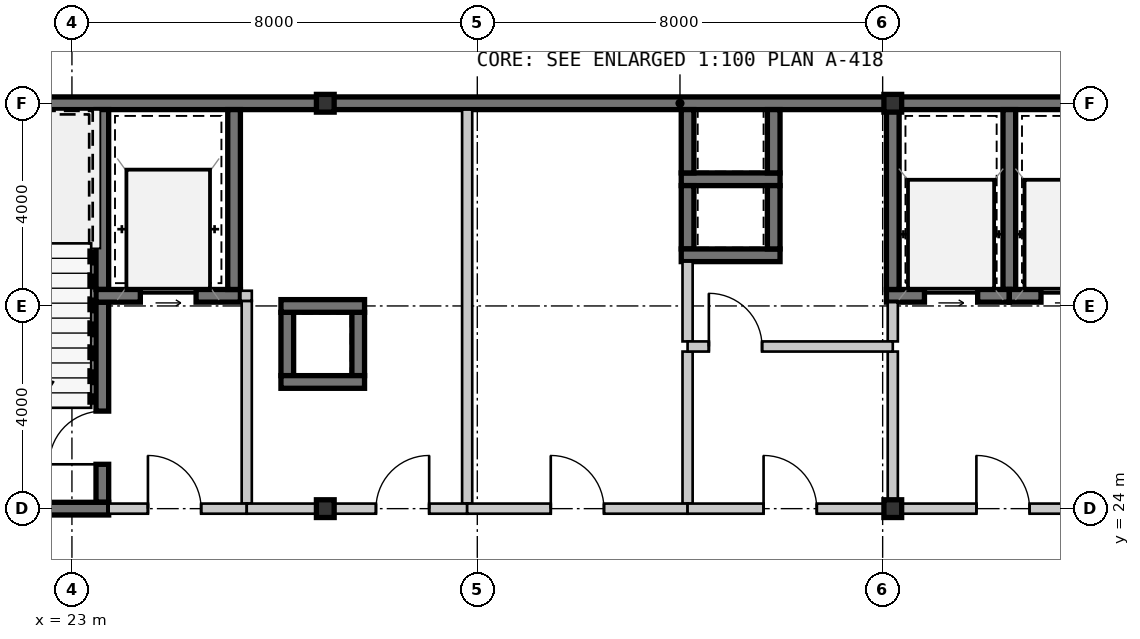
"""IFC4 building model, lengths in metres.
Left out: names, types, materials, properties, quantities, classifications, styles, units other than length and angle.
Written with IfcOpenShell. Run it as: python <this file> out.ifc"""

import sys

from ifc_helpers import new_model, si_unit, direction, frame, frame_2d, origin, origin_2d, place, context, subcontext, project, spatial, rectangle, hollow_rectangle, extrude, source, transform, mapped, element, fill, save


model = new_model("IFC4")
c1 = context("Model", 3, precision=1e-05, world=origin(), true_north=direction((0.0, 1.0)))
c2 = subcontext(c1, "Body", "Model", "MODEL_VIEW")
j1 = project(units=[si_unit("LENGTHUNIT", "METRE"), si_unit("PLANEANGLEUNIT", "RADIAN")], contexts=[c1])
p1 = place(None, origin())
s1 = spatial("IfcSite", under=j1, at=p1, CompositionType="ELEMENT")
p2 = place(p1, origin())
s2 = spatial("IfcBuilding", under=s1, at=p2, CompositionType="ELEMENT")
p3 = place(p2, frame((0.0, 0.0, 172.55)))
s3 = spatial("IfcBuildingStorey", under=s2, at=p3, CompositionType="ELEMENT", Elevation=172.55)
m1 = source(origin(), c2, "Body", "SweptSolid", [
    extrude(hollow_rectangle(XDim=0.35, YDim=0.35, WallThickness=0.016, at=origin_2d()), origin(), (0.0, 0.0, 1.0), 3.15),
])
for number, where, z_axis, x_axis in (
    (1, (28.0, 24.0, 0.0), (0.0, 0.0, 1.0), (1.0, 0.0, 0.0)),
    (2, (39.2, 24.0, 0.0), (0.0, 0.0, 1.0), (1.0, 0.0, 0.0)),
    (3, (28.0, 32.0, 0.0), (0.0, 0.0, 1.0), (1.0, 0.0, 0.0)),
    (4, (39.2, 32.0, 0.0), (0.0, 0.0, 1.0), (1.0, 0.0, 0.0)),
):
    element("IfcColumn", number, at=place(p3, frame(where, z_axis=z_axis, x_axis=x_axis)), inside=s3, PredefinedType="COLUMN", context=c2, shape_type="MappedRepresentation", body=[
        mapped(m1, transform((0.0, 0.0, 0.0), scale=1.0)),
    ])
m2 = source(origin(), c2, "Body", "SweptSolid", [
    extrude(rectangle(XDim=9.125, YDim=0.25, at=frame_2d((4.562, 0.0))), origin(), (0.0, 0.0, 1.0), 2.93),
])
p4 = place(p3, frame((18.875, 32.0, 0.0), z_axis=(0.0, 0.0, 1.0), x_axis=(1.0, 0.0, 0.0)))
e5 = element("IfcWall", 5, at=p4, inside=s3, PredefinedType="SHEAR", context=c2, shape_type="MappedRepresentation", body=[
    mapped(m2, transform((0.0, 0.0, 0.0), scale=1.0)),
])
m3 = source(origin(), c2, "Body", "SweptSolid", [
    extrude(rectangle(XDim=11.2, YDim=0.25, at=frame_2d((5.6, 0.0))), origin(), (0.0, 0.0, 1.0), 2.93),
])
p5 = place(p3, frame((28.0, 32.0, 0.0), z_axis=(0.0, 0.0, 1.0), x_axis=(1.0, 0.0, 0.0)))
e6 = element("IfcWall", 6, at=p5, inside=s3, PredefinedType="SHEAR", context=c2, shape_type="MappedRepresentation", body=[
    mapped(m3, transform((0.0, 0.0, 0.0), scale=1.0)),
])
m4 = source(origin(), c2, "Body", "SweptSolid", [
    extrude(rectangle(XDim=11.925, YDim=0.25, at=frame_2d((5.962, 0.0))), origin(), (0.0, 0.0, 1.0), 2.93),
])
p6 = place(p3, frame((39.2, 32.0, 0.0), z_axis=(0.0, 0.0, 1.0), x_axis=(1.0, 0.0, 0.0)))
e7 = element("IfcWall", 7, at=p6, inside=s3, PredefinedType="SHEAR", context=c2, shape_type="MappedRepresentation", body=[
    mapped(m4, transform((0.0, 0.0, 0.0), scale=1.0)),
])
m5 = source(origin(), c2, "Body", "SweptSolid", [
    extrude(rectangle(XDim=3.55, YDim=0.25, at=frame_2d((1.775, 0.0))), origin(), (0.0, 0.0, 1.0), 2.93),
])
p7 = place(p3, frame((23.6, 28.325, 0.0), z_axis=(0.0, 0.0, 1.0), x_axis=(0.0, 1.0, 0.0)))
e8 = element("IfcWall", 8, at=p7, inside=s3, PredefinedType="SHEAR", context=c2, shape_type="MappedRepresentation", body=[
    mapped(m5, transform((0.0, 0.0, 0.0), scale=1.0)),
])
m6 = source(origin(), c2, "Body", "SweptSolid", [
    extrude(rectangle(XDim=3.95, YDim=0.25, at=frame_2d((1.975, 0.0))), origin(), (0.0, 0.0, 1.0), 2.93),
])
p8 = place(p3, frame((23.6, 24.125, 0.0), z_axis=(0.0, 0.0, 1.0), x_axis=(0.0, 1.0, 0.0)))
e9 = element("IfcWall", 9, at=p8, inside=s3, PredefinedType="SHEAR", context=c2, shape_type="MappedRepresentation", body=[
    mapped(m6, transform((0.0, 0.0, 0.0), scale=1.0)),
])
m7 = source(origin(), c2, "Body", "SweptSolid", [
    extrude(rectangle(XDim=1.05, YDim=2.1, at=frame_2d((0.525, 1.05))), frame((0.0, 0.135, 0.0), z_axis=(0.0, -1.0, 0.0), x_axis=(1.0, 0.0, 0.0)), (0.0, 0.0, 1.0), 0.27),
])
p9 = place(p8, frame((0.75, 0.0, 0.0)))
e10 = element("IfcOpeningElement", 10, at=p9, cuts=e9, PredefinedType="OPENING", context=c2, shape_type="MappedRepresentation", body=[
    mapped(m7, transform((0.0, 0.0, 0.0), scale=1.0)),
])
m8 = source(origin(), c2, "Body", "SweptSolid", [
    extrude(rectangle(XDim=4.85, YDim=0.25, at=frame_2d((2.425, 0.0))), origin(), (0.0, 0.0, 1.0), 2.93),
])
p10 = place(p3, frame((18.875, 24.0, 0.0), z_axis=(0.0, 0.0, 1.0), x_axis=(1.0, 0.0, 0.0)))
e11 = element("IfcWall", 11, at=p10, inside=s3, PredefinedType="SHEAR", context=c2, shape_type="MappedRepresentation", body=[
    mapped(m8, transform((0.0, 0.0, 0.0), scale=1.0)),
])
m9 = source(origin(), c2, "Body", "SweptSolid", [
    extrude(rectangle(XDim=2.85, YDim=0.25, at=frame_2d((1.425, 0.0))), origin(), (0.0, 0.0, 1.0), 2.93),
])
p11 = place(p3, frame((23.475, 28.2, 0.0), z_axis=(0.0, 0.0, 1.0), x_axis=(1.0, 0.0, 0.0)))
e12 = element("IfcWall", 12, at=p11, inside=s3, PredefinedType="SHEAR", context=c2, shape_type="MappedRepresentation", body=[
    mapped(m9, transform((0.0, 0.0, 0.0), scale=1.0)),
])
m10 = source(origin(), c2, "Body", "SweptSolid", [
    extrude(rectangle(XDim=1.1, YDim=2.15, at=frame_2d((0.55, 1.075))), frame((0.0, 0.135, 0.0), z_axis=(0.0, -1.0, 0.0), x_axis=(1.0, 0.0, 0.0)), (0.0, 0.0, 1.0), 0.27),
])
p12 = place(p11, frame((0.875, 0.0, 0.0)))
e13 = element("IfcOpeningElement", 13, at=p12, cuts=e12, PredefinedType="OPENING", context=c2, shape_type="MappedRepresentation", body=[
    mapped(m10, transform((0.0, 0.0, 0.0), scale=1.0)),
])
p13 = place(p3, frame((26.2, 28.325, 0.0), z_axis=(0.0, 0.0, 1.0), x_axis=(0.0, 1.0, 0.0)))
e14 = element("IfcWall", 14, at=p13, inside=s3, PredefinedType="SHEAR", context=c2, shape_type="MappedRepresentation", body=[
    mapped(m5, transform((0.0, 0.0, 0.0), scale=1.0)),
])
m11 = source(origin(), c2, "Body", "SweptSolid", [
    extrude(rectangle(XDim=4.0, YDim=0.2, at=frame_2d((2.0, 0.0))), origin(), (0.0, 0.0, 1.0), 2.93),
])
p14 = place(p3, frame((26.45, 24.1, 0.0), z_axis=(0.0, 0.0, 1.0), x_axis=(0.0, 1.0, 0.0)))
e15 = element("IfcWall", 15, at=p14, inside=s3, PredefinedType="SOLIDWALL", context=c2, shape_type="MappedRepresentation", body=[
    mapped(m11, transform((0.0, 0.0, 0.0), scale=1.0)),
])
m12 = source(origin(), c2, "Body", "SweptSolid", [
    extrude(rectangle(XDim=2.725, YDim=0.2, at=frame_2d((1.362, 0.0))), origin(), (0.0, 0.0, 1.0), 2.47),
])
p15 = place(p3, frame((23.725, 24.0, 0.0), z_axis=(0.0, 0.0, 1.0), x_axis=(1.0, 0.0, 0.0)))
e16 = element("IfcWall", 16, at=p15, inside=s3, PredefinedType="SOLIDWALL", context=c2, shape_type="MappedRepresentation", body=[
    mapped(m12, transform((0.0, 0.0, 0.0), scale=1.0)),
])
m13 = source(origin(), c2, "Body", "SweptSolid", [
    extrude(rectangle(XDim=1.05, YDim=2.1, at=frame_2d((0.525, 1.05))), frame((0.0, 0.11, 0.0), z_axis=(0.0, -1.0, 0.0), x_axis=(1.0, 0.0, 0.0)), (0.0, 0.0, 1.0), 0.22),
])
p16 = place(p15, frame((0.775, 0.0, 0.0)))
e17 = element("IfcOpeningElement", 17, at=p16, cuts=e16, PredefinedType="OPENING", context=c2, shape_type="MappedRepresentation", body=[
    mapped(m13, transform((0.0, 0.0, 0.0), scale=1.0)),
])
m14 = source(origin(), c2, "Body", "SweptSolid", [
    extrude(rectangle(XDim=1.95, YDim=0.25, at=frame_2d((0.975, 0.0))), origin(), (0.0, 0.0, 1.0), 2.93),
])
p17 = place(p3, frame((35.025, 30.5, 0.0), z_axis=(0.0, 0.0, 1.0), x_axis=(1.0, 0.0, 0.0)))
e18 = element("IfcWall", 18, at=p17, inside=s3, PredefinedType="SHEAR", context=c2, shape_type="MappedRepresentation", body=[
    mapped(m14, transform((0.0, 0.0, 0.0), scale=1.0)),
])
m15 = source(origin(), c2, "Body", "SweptSolid", [
    extrude(rectangle(XDim=1.25, YDim=0.25, at=frame_2d((0.625, 0.0))), origin(), (0.0, 0.0, 1.0), 2.93),
])
for number, where, z_axis, x_axis in (
    (19, (35.15, 31.875, 0.0), (0.0, 0.0, 1.0), (0.0, -1.0, 0.0)),
    (20, (36.85, 30.625, 0.0), (0.0, 0.0, 1.0), (0.0, 1.0, 0.0)),
    (21, (35.15, 30.375, 0.0), (0.0, 0.0, 1.0), (0.0, -1.0, 0.0)),
):
    element("IfcWall", number, at=place(p3, frame(where, z_axis=z_axis, x_axis=x_axis)), inside=s3, PredefinedType="SHEAR", context=c2, shape_type="MappedRepresentation", body=[
        mapped(m15, transform((0.0, 0.0, 0.0), scale=1.0)),
    ])
p18 = place(p3, frame((35.025, 29.0, 0.0), z_axis=(0.0, 0.0, 1.0), x_axis=(1.0, 0.0, 0.0)))
e22 = element("IfcWall", 22, at=p18, inside=s3, PredefinedType="SHEAR", context=c2, shape_type="MappedRepresentation", body=[
    mapped(m14, transform((0.0, 0.0, 0.0), scale=1.0)),
])
for number, where, z_axis, x_axis in (
    (23, (36.85, 29.125, 0.0), (0.0, 0.0, 1.0), (0.0, 1.0, 0.0)),
    (24, (28.65, 26.625, 0.0), (0.0, 0.0, 1.0), (0.0, 1.0, 0.0)),
    (25, (27.25, 27.875, 0.0), (0.0, 0.0, 1.0), (0.0, -1.0, 0.0)),
):
    element("IfcWall", number, at=place(p3, frame(where, z_axis=z_axis, x_axis=x_axis)), inside=s3, PredefinedType="SHEAR", context=c2, shape_type="MappedRepresentation", body=[
        mapped(m15, transform((0.0, 0.0, 0.0), scale=1.0)),
    ])
m16 = source(origin(), c2, "Body", "SweptSolid", [
    extrude(rectangle(XDim=1.65, YDim=0.25, at=frame_2d((0.825, 0.0))), origin(), (0.0, 0.0, 1.0), 2.93),
])
for number, where, z_axis, x_axis in (
    (26, (28.775, 28.0, 0.0), (0.0, 0.0, 1.0), (-1.0, 0.0, 0.0)),
    (27, (27.125, 26.5, 0.0), (0.0, 0.0, 1.0), (1.0, 0.0, 0.0)),
):
    element("IfcWall", number, at=place(p3, frame(where, z_axis=z_axis, x_axis=x_axis)), inside=s3, PredefinedType="SHEAR", context=c2, shape_type="MappedRepresentation", body=[
        mapped(m16, transform((0.0, 0.0, 0.0), scale=1.0)),
    ])
p19 = place(p3, frame((41.5, 28.325, 0.0), z_axis=(0.0, 0.0, 1.0), x_axis=(0.0, 1.0, 0.0)))
e28 = element("IfcWall", 28, at=p19, inside=s3, PredefinedType="SHEAR", context=c2, shape_type="MappedRepresentation", body=[
    mapped(m5, transform((0.0, 0.0, 0.0), scale=1.0)),
])
m17 = source(origin(), c2, "Body", "SweptSolid", [
    extrude(rectangle(XDim=2.425, YDim=0.25, at=frame_2d((1.212, 0.0))), origin(), (0.0, 0.0, 1.0), 2.93),
])
p20 = place(p3, frame((39.075, 28.2, 0.0), z_axis=(0.0, 0.0, 1.0), x_axis=(1.0, 0.0, 0.0)))
e29 = element("IfcWall", 29, at=p20, inside=s3, PredefinedType="SHEAR", context=c2, shape_type="MappedRepresentation", body=[
    mapped(m17, transform((0.0, 0.0, 0.0), scale=1.0)),
])
m18 = source(origin(), c2, "Body", "SweptSolid", [
    extrude(rectangle(XDim=1.05, YDim=2.15, at=frame_2d((0.525, 1.075))), frame((0.0, 0.135, 0.0), z_axis=(0.0, -1.0, 0.0), x_axis=(1.0, 0.0, 0.0)), (0.0, 0.0, 1.0), 0.27),
])
p21 = place(p20, frame((0.75, 0.0, 0.0)))
e30 = element("IfcOpeningElement", 30, at=p21, cuts=e29, PredefinedType="OPENING", context=c2, shape_type="MappedRepresentation", body=[
    mapped(m18, transform((0.0, 0.0, 0.0), scale=1.0)),
])
p22 = place(p3, frame((39.2, 31.875, 0.0), z_axis=(0.0, 0.0, 1.0), x_axis=(0.0, -1.0, 0.0)))
e31 = element("IfcWall", 31, at=p22, inside=s3, PredefinedType="SHEAR", context=c2, shape_type="MappedRepresentation", body=[
    mapped(m5, transform((0.0, 0.0, 0.0), scale=1.0)),
])
m19 = source(origin(), c2, "Body", "SweptSolid", [
    extrude(rectangle(XDim=2.07, YDim=0.25, at=frame_2d((1.035, 0.0))), origin(), (0.0, 0.0, 1.0), 2.93),
])
p23 = place(p3, frame((41.5, 28.2, 0.0), z_axis=(0.0, 0.0, 1.0), x_axis=(1.0, 0.0, 0.0)))
e32 = element("IfcWall", 32, at=p23, inside=s3, PredefinedType="SHEAR", context=c2, shape_type="MappedRepresentation", body=[
    mapped(m19, transform((0.0, 0.0, 0.0), scale=1.0)),
])
p24 = place(p23, frame((0.625, 0.0, 0.0)))
e33 = element("IfcOpeningElement", 33, at=p24, cuts=e32, PredefinedType="OPENING", context=c2, shape_type="MappedRepresentation", body=[
    mapped(m18, transform((0.0, 0.0, 0.0), scale=1.0)),
])
m20 = source(origin(), c2, "Body", "SweptSolid", [
    extrude(rectangle(XDim=3.0, YDim=0.2, at=frame_2d((1.5, 0.0))), origin(), (0.0, 0.0, 1.0), 2.47),
])
p25 = place(p3, frame((39.2, 24.1, 0.0), z_axis=(0.0, 0.0, 1.0), x_axis=(0.0, 1.0, 0.0)))
e34 = element("IfcWall", 34, at=p25, inside=s3, PredefinedType="SOLIDWALL", context=c2, shape_type="MappedRepresentation", body=[
    mapped(m20, transform((0.0, 0.0, 0.0), scale=1.0)),
])
m21 = source(origin(), c2, "Body", "SweptSolid", [
    extrude(rectangle(XDim=0.775, YDim=0.2, at=frame_2d((0.387, 0.0))), origin(), (0.0, 0.0, 1.0), 2.47),
])
p26 = place(p3, frame((39.2, 27.3, 0.0), z_axis=(0.0, 0.0, 1.0), x_axis=(0.0, 1.0, 0.0)))
e35 = element("IfcWall", 35, at=p26, inside=s3, PredefinedType="SOLIDWALL", context=c2, shape_type="MappedRepresentation", body=[
    mapped(m21, transform((0.0, 0.0, 0.0), scale=1.0)),
])
m22 = source(origin(), c2, "Body", "SweptSolid", [
    extrude(rectangle(XDim=4.35, YDim=0.2, at=frame_2d((2.175, 0.0))), origin(), (0.0, 0.0, 1.0), 2.397),
])
p27 = place(p3, frame((43.55, 24.0, 0.0), z_axis=(0.0, 0.0, 1.0), x_axis=(-1.0, 0.0, 0.0)))
e36 = element("IfcWall", 36, at=p27, inside=s3, PredefinedType="SOLIDWALL", context=c2, shape_type="MappedRepresentation", body=[
    mapped(m22, transform((0.0, 0.0, 0.0), scale=1.0)),
])
p28 = place(p27, frame((1.65, 0.0, 0.0)))
e37 = element("IfcOpeningElement", 37, at=p28, cuts=e36, PredefinedType="OPENING", context=c2, shape_type="MappedRepresentation", body=[
    mapped(m13, transform((0.0, 0.0, 0.0), scale=1.0)),
])
m23 = source(origin(), c2, "Body", "SweptSolid", [
    extrude(rectangle(XDim=7.775, YDim=0.2, at=frame_2d((3.887, 0.0))), origin(), (0.0, 0.0, 1.0), 2.93),
])
p29 = place(p3, frame((30.8, 31.875, 0.0), z_axis=(0.0, 0.0, 1.0), x_axis=(0.0, -1.0, 0.0)))
e38 = element("IfcWall", 38, at=p29, inside=s3, PredefinedType="SOLIDWALL", context=c2, shape_type="MappedRepresentation", body=[
    mapped(m23, transform((0.0, 0.0, 0.0), scale=1.0)),
])
m24 = source(origin(), c2, "Body", "SweptSolid", [
    extrude(rectangle(XDim=4.35, YDim=0.2, at=frame_2d((2.175, 0.0))), origin(), (0.0, 0.0, 1.0), 2.47),
])
p30 = place(p3, frame((30.8, 24.0, 0.0), z_axis=(0.0, 0.0, 1.0), x_axis=(-1.0, 0.0, 0.0)))
e39 = element("IfcWall", 39, at=p30, inside=s3, PredefinedType="SOLIDWALL", context=c2, shape_type="MappedRepresentation", body=[
    mapped(m24, transform((0.0, 0.0, 0.0), scale=1.0)),
])
p31 = place(p30, frame((0.75, 0.0, 0.0)))
e40 = element("IfcOpeningElement", 40, at=p31, cuts=e39, PredefinedType="OPENING", context=c2, shape_type="MappedRepresentation", body=[
    mapped(m13, transform((0.0, 0.0, 0.0), scale=1.0)),
])
m25 = source(origin(), c2, "Body", "SweptSolid", [
    extrude(rectangle(XDim=3.0, YDim=0.2, at=frame_2d((1.5, 0.0))), origin(), (0.0, 0.0, 1.0), 2.93),
])
p32 = place(p3, frame((35.15, 27.1, 0.0), z_axis=(0.0, 0.0, 1.0), x_axis=(0.0, -1.0, 0.0)))
e41 = element("IfcWall", 41, at=p32, inside=s3, PredefinedType="SOLIDWALL", context=c2, shape_type="MappedRepresentation", body=[
    mapped(m25, transform((0.0, 0.0, 0.0), scale=1.0)),
])
m26 = source(origin(), c2, "Body", "SweptSolid", [
    extrude(rectangle(XDim=1.575, YDim=0.2, at=frame_2d((0.788, 0.0))), origin(), (0.0, 0.0, 1.0), 2.93),
])
p33 = place(p3, frame((35.15, 28.875, 0.0), z_axis=(0.0, 0.0, 1.0), x_axis=(0.0, -1.0, 0.0)))
e42 = element("IfcWall", 42, at=p33, inside=s3, PredefinedType="SOLIDWALL", context=c2, shape_type="MappedRepresentation", body=[
    mapped(m26, transform((0.0, 0.0, 0.0), scale=1.0)),
])
m27 = source(origin(), c2, "Body", "SweptSolid", [
    extrude(rectangle(XDim=4.35, YDim=0.2, at=frame_2d((2.175, 0.0))), origin(), (0.0, 0.0, 1.0), 2.47),
])
p34 = place(p3, frame((35.15, 24.0, 0.0), z_axis=(0.0, 0.0, 1.0), x_axis=(-1.0, 0.0, 0.0)))
e43 = element("IfcWall", 43, at=p34, inside=s3, PredefinedType="SOLIDWALL", context=c2, shape_type="MappedRepresentation", body=[
    mapped(m27, transform((0.0, 0.0, 0.0), scale=1.0)),
])
p35 = place(p34, frame((1.65, 0.0, 0.0)))
e44 = element("IfcOpeningElement", 44, at=p35, cuts=e43, PredefinedType="OPENING", context=c2, shape_type="MappedRepresentation", body=[
    mapped(m13, transform((0.0, 0.0, 0.0), scale=1.0)),
])
m28 = source(origin(), c2, "Body", "SweptSolid", [
    extrude(rectangle(XDim=4.05, YDim=0.2, at=frame_2d((2.025, 0.0))), origin(), (0.0, 0.0, 1.0), 2.93),
])
p36 = place(p3, frame((35.15, 27.2, 0.0), z_axis=(0.0, 0.0, 1.0), x_axis=(1.0, 0.0, 0.0)))
e45 = element("IfcWall", 45, at=p36, inside=s3, PredefinedType="SOLIDWALL", context=c2, shape_type="MappedRepresentation", body=[
    mapped(m28, transform((0.0, 0.0, 0.0), scale=1.0)),
])
p37 = place(p36, frame((0.42, 0.0, 0.0)))
e46 = element("IfcOpeningElement", 46, at=p37, cuts=e45, PredefinedType="OPENING", context=c2, shape_type="MappedRepresentation", body=[
    mapped(m13, transform((0.0, 0.0, 0.0), scale=1.0)),
])
m29 = source(origin(), c2, "Body", "SweptSolid", [
    extrude(rectangle(XDim=4.05, YDim=0.2, at=frame_2d((2.025, 0.0))), origin(), (0.0, 0.0, 1.0), 2.47),
])
p38 = place(p3, frame((39.2, 24.0, 0.0), z_axis=(0.0, 0.0, 1.0), x_axis=(-1.0, 0.0, 0.0)))
e47 = element("IfcWall", 47, at=p38, inside=s3, PredefinedType="SOLIDWALL", context=c2, shape_type="MappedRepresentation", body=[
    mapped(m29, transform((0.0, 0.0, 0.0), scale=1.0)),
])
p39 = place(p38, frame((1.5, 0.0, 0.0)))
e48 = element("IfcOpeningElement", 48, at=p39, cuts=e47, PredefinedType="OPENING", context=c2, shape_type="MappedRepresentation", body=[
    mapped(m13, transform((0.0, 0.0, 0.0), scale=1.0)),
])
m30 = source(origin(), c2, "Body", "SweptSolid", [
    extrude(rectangle(XDim=0.225, YDim=0.2, at=frame_2d((0.113, 0.0))), origin(), (0.0, 0.0, 1.0), 2.93),
])
p40 = place(p3, frame((26.325, 28.2, 0.0), z_axis=(0.0, 0.0, 1.0), x_axis=(1.0, 0.0, 0.0)))
e49 = element("IfcWall", 49, at=p40, inside=s3, PredefinedType="SOLIDWALL", context=c2, shape_type="MappedRepresentation", body=[
    mapped(m30, transform((0.0, 0.0, 0.0), scale=1.0)),
])
m31 = source(origin(), c2, "Body", "SweptSolid", [
    extrude(rectangle(XDim=1.05, YDim=2.1, at=frame_2d((0.525, 1.05))), frame((0.0, 0.025, 0.0), z_axis=(0.0, -1.0, 0.0), x_axis=(1.0, 0.0, 0.0)), (0.0, 0.0, 1.0), 0.05),
])
p41 = place(p9, origin())
e50 = element("IfcDoor", 50, at=p41, inside=s3, OperationType="SINGLE_SWING_LEFT", PredefinedType="DOOR", context=c2, shape_type="MappedRepresentation", body=[
    mapped(m31, transform((0.0, 0.0, 0.0), scale=1.0)),
])
fill(e10, e50)
m32 = source(origin(), c2, "Body", "SweptSolid", [
    extrude(rectangle(XDim=1.1, YDim=2.15, at=frame_2d((0.55, 1.075))), frame((0.0, 0.025, 0.0), z_axis=(0.0, -1.0, 0.0), x_axis=(1.0, 0.0, 0.0)), (0.0, 0.0, 1.0), 0.05),
])
p42 = place(p12, origin())
e51 = element("IfcDoor", 51, at=p42, inside=s3, OperationType="SLIDING_TO_LEFT", PredefinedType="DOOR", context=c2, shape_type="MappedRepresentation", body=[
    mapped(m32, transform((0.0, 0.0, 0.0), scale=1.0)),
])
fill(e13, e51)
p43 = place(p16, origin())
e52 = element("IfcDoor", 52, at=p43, inside=s3, OperationType="SINGLE_SWING_LEFT", PredefinedType="DOOR", context=c2, shape_type="MappedRepresentation", body=[
    mapped(m31, transform((0.0, 0.0, 0.0), scale=1.0)),
])
fill(e17, e52)
m33 = source(origin(), c2, "Body", "SweptSolid", [
    extrude(rectangle(XDim=1.05, YDim=2.15, at=frame_2d((0.525, 1.075))), frame((0.0, 0.025, 0.0), z_axis=(0.0, -1.0, 0.0), x_axis=(1.0, 0.0, 0.0)), (0.0, 0.0, 1.0), 0.05),
])
p44 = place(p21, origin())
e53 = element("IfcDoor", 53, at=p44, inside=s3, OperationType="SLIDING_TO_LEFT", PredefinedType="DOOR", context=c2, shape_type="MappedRepresentation", body=[
    mapped(m33, transform((0.0, 0.0, 0.0), scale=1.0)),
])
fill(e30, e53)
p45 = place(p24, origin())
e54 = element("IfcDoor", 54, at=p45, inside=s3, OperationType="SLIDING_TO_LEFT", PredefinedType="DOOR", context=c2, shape_type="MappedRepresentation", body=[
    mapped(m33, transform((0.0, 0.0, 0.0), scale=1.0)),
])
fill(e33, e54)
p46 = place(p28, frame((1.05, 0.0, 0.0), z_axis=(0.0, 0.0, 1.0), x_axis=(-1.0, 0.0, 0.0)))
e55 = element("IfcDoor", 55, at=p46, inside=s3, OperationType="SINGLE_SWING_LEFT", PredefinedType="DOOR", context=c2, shape_type="MappedRepresentation", body=[
    mapped(m31, transform((0.0, 0.0, 0.0), scale=1.0)),
])
fill(e37, e55)
p47 = place(p31, frame((1.05, 0.0, 0.0), z_axis=(0.0, 0.0, 1.0), x_axis=(-1.0, 0.0, 0.0)))
e56 = element("IfcDoor", 56, at=p47, inside=s3, OperationType="SINGLE_SWING_RIGHT", PredefinedType="DOOR", context=c2, shape_type="MappedRepresentation", body=[
    mapped(m31, transform((0.0, 0.0, 0.0), scale=1.0)),
])
fill(e40, e56)
p48 = place(p35, frame((1.05, 0.0, 0.0), z_axis=(0.0, 0.0, 1.0), x_axis=(-1.0, 0.0, 0.0)))
e57 = element("IfcDoor", 57, at=p48, inside=s3, OperationType="SINGLE_SWING_LEFT", PredefinedType="DOOR", context=c2, shape_type="MappedRepresentation", body=[
    mapped(m31, transform((0.0, 0.0, 0.0), scale=1.0)),
])
fill(e44, e57)
p49 = place(p37, origin())
e58 = element("IfcDoor", 58, at=p49, inside=s3, OperationType="SINGLE_SWING_LEFT", PredefinedType="DOOR", context=c2, shape_type="MappedRepresentation", body=[
    mapped(m31, transform((0.0, 0.0, 0.0), scale=1.0)),
])
fill(e46, e58)
p50 = place(p39, frame((1.05, 0.0, 0.0), z_axis=(0.0, 0.0, 1.0), x_axis=(-1.0, 0.0, 0.0)))
e59 = element("IfcDoor", 59, at=p50, inside=s3, OperationType="SINGLE_SWING_LEFT", PredefinedType="DOOR", context=c2, shape_type="MappedRepresentation", body=[
    mapped(m31, transform((0.0, 0.0, 0.0), scale=1.0)),
])
fill(e48, e59)
save(model, sys.argv[1])
